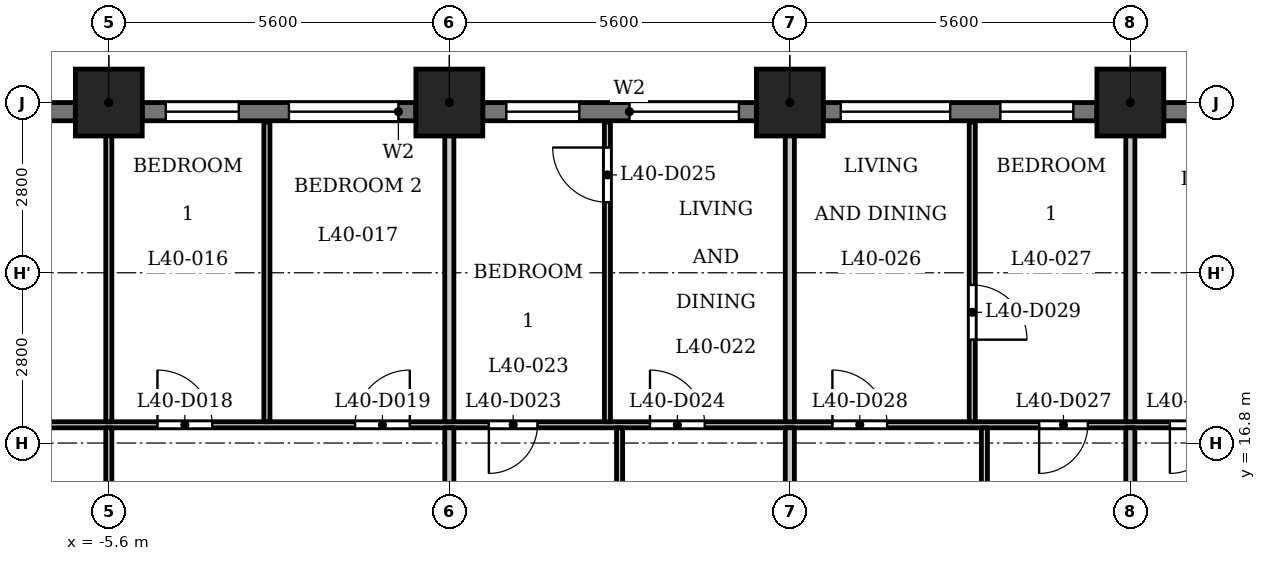
"""IFC4 building model, lengths in metres.
Left out: names, types, materials, properties, quantities, classifications, styles, units other than length and angle.
Written with IfcOpenShell. Run it as: python <this file> out.ifc"""

import sys

from ifc_helpers import new_model, si_unit, direction, frame, frame_2d, origin, origin_2d, place, context, subcontext, project, spatial, rectangle, extrude, element, fill, save


model = new_model("IFC4")
c1 = context("Model", 3, precision=1e-05, world=origin(), true_north=direction((0.0, 1.0)))
c2 = subcontext(c1, "Body", "Model", "MODEL_VIEW")
j1 = project(units=[si_unit("LENGTHUNIT", "METRE"), si_unit("PLANEANGLEUNIT", "RADIAN")], contexts=[c1])
p1 = place(None, origin())
s1 = spatial("IfcSite", under=j1, at=p1, CompositionType="ELEMENT")
p2 = place(p1, origin())
s2 = spatial("IfcBuilding", under=s1, at=p2, CompositionType="ELEMENT")
p3 = place(p2, frame((0.0, 0.0, 157.1)))
s3 = spatial("IfcBuildingStorey", under=s2, at=p3, CompositionType="ELEMENT", Elevation=157.1)
for number, where, z_axis, x_axis in (
    (1, (11.2, 22.4, 0.0), (0.0, 0.0, 1.0), (1.0, 0.0, 0.0)),
    (2, (5.6, 22.4, 0.0), (0.0, 0.0, 1.0), (1.0, 0.0, 0.0)),
    (3, (0.0, 22.4, 0.0), (0.0, 0.0, 1.0), (1.0, 0.0, 0.0)),
    (4, (-5.6, 22.4, 0.0), (0.0, 0.0, 1.0), (1.0, 0.0, 0.0)),
):
    element("IfcColumn", number, at=place(p3, frame(where, z_axis=z_axis, x_axis=x_axis)), inside=s3, PredefinedType="COLUMN", context=c2, shape_type="SweptSolid", body=[
        extrude(rectangle(XDim=1.1, YDim=1.1, at=origin_2d()), origin(), (0.0, 0.0, 1.0), 3.5),
    ])
p4 = place(p3, frame((16.25, 22.25, 0.0), z_axis=(0.0, 0.0, 1.0), x_axis=(-1.0, 0.0, 0.0)))
e5 = element("IfcWall", 5, at=p4, inside=s3, PredefinedType="SOLIDWALL", context=c2, shape_type="SweptSolid", body=[
    extrude(rectangle(XDim=4.5, YDim=0.3, at=frame_2d((2.25, 0.0))), origin(), (0.0, 0.0, 1.0), 2.45),
])
p5 = place(p4, frame((0.45, 0.0, 1.2)))
e6 = element("IfcOpeningElement", 6, at=p5, cuts=e5, PredefinedType="OPENING", context=c2, shape_type="SweptSolid", body=[
    extrude(rectangle(XDim=3.6, YDim=0.95, at=frame_2d((1.8, 0.475))), frame((0.0, 0.16, 0.0), z_axis=(0.0, -1.0, 0.0), x_axis=(1.0, 0.0, 0.0)), (0.0, 0.0, 1.0), 0.32),
])
p6 = place(p3, frame((10.65, 22.25, 0.0), z_axis=(0.0, 0.0, 1.0), x_axis=(-1.0, 0.0, 0.0)))
e7 = element("IfcWall", 7, at=p6, inside=s3, PredefinedType="SOLIDWALL", context=c2, shape_type="SweptSolid", body=[
    extrude(rectangle(XDim=4.5, YDim=0.3, at=frame_2d((2.25, 0.0))), origin(), (0.0, 0.0, 1.0), 2.45),
])
p7 = place(p6, frame((0.387, 0.0, 0.6)))
e8 = element("IfcOpeningElement", 8, at=p7, cuts=e7, PredefinedType="OPENING", context=c2, shape_type="SweptSolid", body=[
    extrude(rectangle(XDim=1.2, YDim=1.55, at=frame_2d((0.6, 0.775))), frame((0.0, 0.16, 0.0), z_axis=(0.0, -1.0, 0.0), x_axis=(1.0, 0.0, 0.0)), (0.0, 0.0, 1.0), 0.32),
])
p8 = place(p6, frame((2.413, 0.0, 0.9)))
e9 = element("IfcOpeningElement", 9, at=p8, cuts=e7, PredefinedType="OPENING", context=c2, shape_type="SweptSolid", body=[
    extrude(rectangle(XDim=1.8, YDim=1.25, at=frame_2d((0.9, 0.625))), frame((0.0, 0.16, 0.0), z_axis=(0.0, -1.0, 0.0), x_axis=(1.0, 0.0, 0.0)), (0.0, 0.0, 1.0), 0.32),
])
p9 = place(p3, frame((5.05, 22.25, 0.0), z_axis=(0.0, 0.0, 1.0), x_axis=(-1.0, 0.0, 0.0)))
e10 = element("IfcWall", 10, at=p9, inside=s3, PredefinedType="SOLIDWALL", context=c2, shape_type="SweptSolid", body=[
    extrude(rectangle(XDim=4.5, YDim=0.3, at=frame_2d((2.25, 0.0))), origin(), (0.0, 0.0, 1.0), 2.45),
])
p10 = place(p9, frame((0.288, 0.0, 0.9)))
e11 = element("IfcOpeningElement", 11, at=p10, cuts=e10, PredefinedType="OPENING", context=c2, shape_type="SweptSolid", body=[
    extrude(rectangle(XDim=1.8, YDim=1.25, at=frame_2d((0.9, 0.625))), frame((0.0, 0.16, 0.0), z_axis=(0.0, -1.0, 0.0), x_axis=(1.0, 0.0, 0.0)), (0.0, 0.0, 1.0), 0.32),
])
p11 = place(p9, frame((2.913, 0.0, 0.6)))
e12 = element("IfcOpeningElement", 12, at=p11, cuts=e10, PredefinedType="OPENING", context=c2, shape_type="SweptSolid", body=[
    extrude(rectangle(XDim=1.2, YDim=1.55, at=frame_2d((0.6, 0.775))), frame((0.0, 0.16, 0.0), z_axis=(0.0, -1.0, 0.0), x_axis=(1.0, 0.0, 0.0)), (0.0, 0.0, 1.0), 0.32),
])
p12 = place(p3, frame((-0.55, 22.25, 0.0), z_axis=(0.0, 0.0, 1.0), x_axis=(-1.0, 0.0, 0.0)))
e13 = element("IfcWall", 13, at=p12, inside=s3, PredefinedType="SOLIDWALL", context=c2, shape_type="SweptSolid", body=[
    extrude(rectangle(XDim=4.5, YDim=0.3, at=frame_2d((2.25, 0.0))), origin(), (0.0, 0.0, 1.0), 2.45),
])
p13 = place(p12, frame((0.288, 0.0, 0.9)))
e14 = element("IfcOpeningElement", 14, at=p13, cuts=e13, PredefinedType="OPENING", context=c2, shape_type="SweptSolid", body=[
    extrude(rectangle(XDim=1.8, YDim=1.25, at=frame_2d((0.9, 0.625))), frame((0.0, 0.16, 0.0), z_axis=(0.0, -1.0, 0.0), x_axis=(1.0, 0.0, 0.0)), (0.0, 0.0, 1.0), 0.32),
])
p14 = place(p12, frame((2.913, 0.0, 0.6)))
e15 = element("IfcOpeningElement", 15, at=p14, cuts=e13, PredefinedType="OPENING", context=c2, shape_type="SweptSolid", body=[
    extrude(rectangle(XDim=1.2, YDim=1.55, at=frame_2d((0.6, 0.775))), frame((0.0, 0.16, 0.0), z_axis=(0.0, -1.0, 0.0), x_axis=(1.0, 0.0, 0.0)), (0.0, 0.0, 1.0), 0.32),
])
p15 = place(p3, frame((-6.15, 22.25, 0.0), z_axis=(0.0, 0.0, 1.0), x_axis=(-1.0, 0.0, 0.0)))
e16 = element("IfcWall", 16, at=p15, inside=s3, PredefinedType="SOLIDWALL", context=c2, shape_type="SweptSolid", body=[
    extrude(rectangle(XDim=4.5, YDim=0.3, at=frame_2d((2.25, 0.0))), origin(), (0.0, 0.0, 1.0), 2.45),
])
p16 = place(p15, frame((0.45, 0.0, 1.2)))
e17 = element("IfcOpeningElement", 17, at=p16, cuts=e16, PredefinedType="OPENING", context=c2, shape_type="SweptSolid", body=[
    extrude(rectangle(XDim=3.6, YDim=0.95, at=frame_2d((1.8, 0.475))), frame((0.0, 0.16, 0.0), z_axis=(0.0, -1.0, 0.0), x_axis=(1.0, 0.0, 0.0)), (0.0, 0.0, 1.0), 0.32),
])
p17 = place(p3, frame((-16.725, 17.1, 0.0), z_axis=(0.0, 0.0, 1.0), x_axis=(1.0, 0.0, 0.0)))
e18 = element("IfcWall", 18, at=p17, inside=s3, PredefinedType="PARTITIONING", context=c2, shape_type="SweptSolid", body=[
    extrude(rectangle(XDim=33.45, YDim=0.1, at=frame_2d((16.725, 0.0))), origin(), (0.0, 0.0, 1.0), 3.2),
])
p18 = place(p17, frame((11.925, 0.0, 0.0)))
e19 = element("IfcOpeningElement", 19, at=p18, cuts=e18, PredefinedType="OPENING", context=c2, shape_type="SweptSolid", body=[
    extrude(rectangle(XDim=0.9, YDim=2.1, at=frame_2d((0.45, 1.05))), frame((0.0, 0.06, 0.0), z_axis=(0.0, -1.0, 0.0), x_axis=(1.0, 0.0, 0.0)), (0.0, 0.0, 1.0), 0.12),
])
p19 = place(p17, frame((15.175, 0.0, 0.0)))
e20 = element("IfcOpeningElement", 20, at=p19, cuts=e18, PredefinedType="OPENING", context=c2, shape_type="SweptSolid", body=[
    extrude(rectangle(XDim=0.9, YDim=2.1, at=frame_2d((0.45, 1.05))), frame((0.0, 0.06, 0.0), z_axis=(0.0, -1.0, 0.0), x_axis=(1.0, 0.0, 0.0)), (0.0, 0.0, 1.0), 0.12),
])
p20 = place(p17, frame((6.575, 0.0, 0.0)))
e21 = element("IfcOpeningElement", 21, at=p20, cuts=e18, PredefinedType="OPENING", context=c2, shape_type="SweptSolid", body=[
    extrude(rectangle(XDim=0.9, YDim=2.1, at=frame_2d((0.45, 1.05))), frame((0.0, 0.06, 0.0), z_axis=(0.0, -1.0, 0.0), x_axis=(1.0, 0.0, 0.0)), (0.0, 0.0, 1.0), 0.12),
])
p21 = place(p17, frame((17.375, 0.0, 0.0)))
e22 = element("IfcOpeningElement", 22, at=p21, cuts=e18, PredefinedType="OPENING", context=c2, shape_type="SweptSolid", body=[
    extrude(rectangle(XDim=0.8, YDim=2.1, at=frame_2d((0.4, 1.05))), frame((0.0, 0.06, 0.0), z_axis=(0.0, -1.0, 0.0), x_axis=(1.0, 0.0, 0.0)), (0.0, 0.0, 1.0), 0.12),
])
p22 = place(p17, frame((20.025, 0.0, 0.0)))
e23 = element("IfcOpeningElement", 23, at=p22, cuts=e18, PredefinedType="OPENING", context=c2, shape_type="SweptSolid", body=[
    extrude(rectangle(XDim=0.9, YDim=2.1, at=frame_2d((0.45, 1.05))), frame((0.0, 0.06, 0.0), z_axis=(0.0, -1.0, 0.0), x_axis=(1.0, 0.0, 0.0)), (0.0, 0.0, 1.0), 0.12),
])
p23 = place(p17, frame((26.425, 0.0, 0.0)))
e24 = element("IfcOpeningElement", 24, at=p23, cuts=e18, PredefinedType="OPENING", context=c2, shape_type="SweptSolid", body=[
    extrude(rectangle(XDim=0.8, YDim=2.1, at=frame_2d((0.4, 1.05))), frame((0.0, 0.06, 0.0), z_axis=(0.0, -1.0, 0.0), x_axis=(1.0, 0.0, 0.0)), (0.0, 0.0, 1.0), 0.12),
])
p24 = place(p17, frame((23.025, 0.0, 0.0)))
e25 = element("IfcOpeningElement", 25, at=p24, cuts=e18, PredefinedType="OPENING", context=c2, shape_type="SweptSolid", body=[
    extrude(rectangle(XDim=0.9, YDim=2.1, at=frame_2d((0.45, 1.05))), frame((0.0, 0.06, 0.0), z_axis=(0.0, -1.0, 0.0), x_axis=(1.0, 0.0, 0.0)), (0.0, 0.0, 1.0), 0.12),
])
p25 = place(p17, frame((28.575, 0.0, 0.0)))
e26 = element("IfcOpeningElement", 26, at=p25, cuts=e18, PredefinedType="OPENING", context=c2, shape_type="SweptSolid", body=[
    extrude(rectangle(XDim=0.8, YDim=2.1, at=frame_2d((0.4, 1.05))), frame((0.0, 0.06, 0.0), z_axis=(0.0, -1.0, 0.0), x_axis=(1.0, 0.0, 0.0)), (0.0, 0.0, 1.0), 0.12),
])
p26 = place(p17, frame((30.725, 0.0, 0.0)))
e27 = element("IfcOpeningElement", 27, at=p26, cuts=e18, PredefinedType="OPENING", context=c2, shape_type="SweptSolid", body=[
    extrude(rectangle(XDim=0.9, YDim=2.1, at=frame_2d((0.45, 1.05))), frame((0.0, 0.06, 0.0), z_axis=(0.0, -1.0, 0.0), x_axis=(1.0, 0.0, 0.0)), (0.0, 0.0, 1.0), 0.12),
])
p27 = place(p3, frame((-5.6, 13.275, 0.0), z_axis=(0.0, 0.0, 1.0), x_axis=(0.0, 1.0, 0.0)))
e28 = element("IfcWall", 28, at=p27, inside=s3, PredefinedType="PARTITIONING", context=c2, shape_type="SweptSolid", body=[
    extrude(rectangle(XDim=3.775, YDim=0.1, at=frame_2d((1.888, 0.0))), origin(), (0.0, 0.0, 1.0), 3.2),
])
p28 = place(p27, frame((0.525, 0.0, 0.0)))
e29 = element("IfcOpeningElement", 29, at=p28, cuts=e28, PredefinedType="OPENING", context=c2, shape_type="SweptSolid", body=[
    extrude(rectangle(XDim=0.9, YDim=2.1, at=frame_2d((0.45, 1.05))), frame((0.0, 0.06, 0.0), z_axis=(0.0, -1.0, 0.0), x_axis=(1.0, 0.0, 0.0)), (0.0, 0.0, 1.0), 0.12),
])
p29 = place(p3, frame((-5.6, 17.15, 0.0), z_axis=(0.0, 0.0, 1.0), x_axis=(0.0, 1.0, 0.0)))
e30 = element("IfcWall", 30, at=p29, inside=s3, PredefinedType="PARTITIONING", context=c2, shape_type="SweptSolid", body=[
    extrude(rectangle(XDim=5.78, YDim=0.1, at=frame_2d((2.89, 0.0))), origin(), (0.0, 0.0, 1.0), 3.2),
])
p30 = place(p3, frame((-3.0, 17.15, 0.0), z_axis=(0.0, 0.0, 1.0), x_axis=(0.0, 1.0, 0.0)))
e31 = element("IfcWall", 31, at=p30, inside=s3, PredefinedType="PARTITIONING", context=c2, shape_type="SweptSolid", body=[
    extrude(rectangle(XDim=4.93, YDim=0.1, at=frame_2d((2.465, 0.0))), origin(), (0.0, 0.0, 1.0), 3.2),
])
p31 = place(p3, frame((0.0, 13.275, 0.0), z_axis=(0.0, 0.0, 1.0), x_axis=(0.0, 1.0, 0.0)))
e32 = element("IfcWall", 32, at=p31, inside=s3, PredefinedType="PARTITIONING", context=c2, shape_type="SweptSolid", body=[
    extrude(rectangle(XDim=3.775, YDim=0.15, at=frame_2d((1.888, 0.0))), origin(), (0.0, 0.0, 1.0), 3.2),
])
p32 = place(p3, frame((0.0, 17.15, 0.0), z_axis=(0.0, 0.0, 1.0), x_axis=(0.0, 1.0, 0.0)))
e33 = element("IfcWall", 33, at=p32, inside=s3, PredefinedType="PARTITIONING", context=c2, shape_type="SweptSolid", body=[
    extrude(rectangle(XDim=5.78, YDim=0.15, at=frame_2d((2.89, 0.0))), origin(), (0.0, 0.0, 1.0), 3.2),
])
p33 = place(p3, frame((2.6, 17.15, 0.0), z_axis=(0.0, 0.0, 1.0), x_axis=(0.0, 1.0, 0.0)))
e34 = element("IfcWall", 34, at=p33, inside=s3, PredefinedType="PARTITIONING", context=c2, shape_type="SweptSolid", body=[
    extrude(rectangle(XDim=4.93, YDim=0.1, at=frame_2d((2.465, 0.0))), origin(), (0.0, 0.0, 1.0), 3.2),
])
p34 = place(p33, frame((3.61, 0.0, 0.0)))
e35 = element("IfcOpeningElement", 35, at=p34, cuts=e34, PredefinedType="OPENING", context=c2, shape_type="SweptSolid", body=[
    extrude(rectangle(XDim=0.9, YDim=2.1, at=frame_2d((0.45, 1.05))), frame((0.0, 0.06, 0.0), z_axis=(0.0, -1.0, 0.0), x_axis=(1.0, 0.0, 0.0)), (0.0, 0.0, 1.0), 0.12),
])
p35 = place(p3, frame((2.8, 13.275, 0.0), z_axis=(0.0, 0.0, 1.0), x_axis=(0.0, 1.0, 0.0)))
e36 = element("IfcWall", 36, at=p35, inside=s3, PredefinedType="PARTITIONING", context=c2, shape_type="SweptSolid", body=[
    extrude(rectangle(XDim=3.775, YDim=0.1, at=frame_2d((1.888, 0.0))), origin(), (0.0, 0.0, 1.0), 3.2),
])
p36 = place(p3, frame((5.6, 13.275, 0.0), z_axis=(0.0, 0.0, 1.0), x_axis=(0.0, 1.0, 0.0)))
e37 = element("IfcWall", 37, at=p36, inside=s3, PredefinedType="PARTITIONING", context=c2, shape_type="SweptSolid", body=[
    extrude(rectangle(XDim=3.775, YDim=0.15, at=frame_2d((1.888, 0.0))), origin(), (0.0, 0.0, 1.0), 3.2),
])
p37 = place(p3, frame((5.6, 17.15, 0.0), z_axis=(0.0, 0.0, 1.0), x_axis=(0.0, 1.0, 0.0)))
e38 = element("IfcWall", 38, at=p37, inside=s3, PredefinedType="PARTITIONING", context=c2, shape_type="SweptSolid", body=[
    extrude(rectangle(XDim=5.78, YDim=0.15, at=frame_2d((2.89, 0.0))), origin(), (0.0, 0.0, 1.0), 3.2),
])
p38 = place(p3, frame((8.6, 17.15, 0.0), z_axis=(0.0, 0.0, 1.0), x_axis=(0.0, 1.0, 0.0)))
e39 = element("IfcWall", 39, at=p38, inside=s3, PredefinedType="PARTITIONING", context=c2, shape_type="SweptSolid", body=[
    extrude(rectangle(XDim=4.93, YDim=0.1, at=frame_2d((2.465, 0.0))), origin(), (0.0, 0.0, 1.0), 3.2),
])
p39 = place(p38, frame((1.35, 0.0, 0.0)))
e40 = element("IfcOpeningElement", 40, at=p39, cuts=e39, PredefinedType="OPENING", context=c2, shape_type="SweptSolid", body=[
    extrude(rectangle(XDim=0.9, YDim=2.1, at=frame_2d((0.45, 1.05))), frame((0.0, 0.06, 0.0), z_axis=(0.0, -1.0, 0.0), x_axis=(1.0, 0.0, 0.0)), (0.0, 0.0, 1.0), 0.12),
])
p40 = place(p3, frame((8.8, 13.275, 0.0), z_axis=(0.0, 0.0, 1.0), x_axis=(0.0, 1.0, 0.0)))
e41 = element("IfcWall", 41, at=p40, inside=s3, PredefinedType="PARTITIONING", context=c2, shape_type="SweptSolid", body=[
    extrude(rectangle(XDim=3.775, YDim=0.1, at=frame_2d((1.888, 0.0))), origin(), (0.0, 0.0, 1.0), 3.2),
])
p41 = place(p3, frame((11.2, 13.275, 0.0), z_axis=(0.0, 0.0, 1.0), x_axis=(0.0, 1.0, 0.0)))
e42 = element("IfcWall", 42, at=p41, inside=s3, PredefinedType="PARTITIONING", context=c2, shape_type="SweptSolid", body=[
    extrude(rectangle(XDim=3.775, YDim=0.15, at=frame_2d((1.888, 0.0))), origin(), (0.0, 0.0, 1.0), 3.2),
])
p42 = place(p3, frame((11.2, 17.15, 0.0), z_axis=(0.0, 0.0, 1.0), x_axis=(0.0, 1.0, 0.0)))
e43 = element("IfcWall", 43, at=p42, inside=s3, PredefinedType="PARTITIONING", context=c2, shape_type="SweptSolid", body=[
    extrude(rectangle(XDim=5.78, YDim=0.15, at=frame_2d((2.89, 0.0))), origin(), (0.0, 0.0, 1.0), 3.2),
])
p43 = place(p18, origin())
e44 = element("IfcDoor", 44, at=p43, inside=s3, OperationType="SINGLE_SWING_RIGHT", PredefinedType="DOOR", context=c2, shape_type="SweptSolid", body=[
    extrude(rectangle(XDim=0.9, YDim=2.1, at=frame_2d((0.45, 1.05))), frame((0.0, 0.025, 0.0), z_axis=(0.0, -1.0, 0.0), x_axis=(1.0, 0.0, 0.0)), (0.0, 0.0, 1.0), 0.05),
])
fill(e19, e44)
p44 = place(p19, origin())
e45 = element("IfcDoor", 45, at=p44, inside=s3, OperationType="SINGLE_SWING_LEFT", PredefinedType="DOOR", context=c2, shape_type="SweptSolid", body=[
    extrude(rectangle(XDim=0.9, YDim=2.1, at=frame_2d((0.45, 1.05))), frame((0.0, 0.025, 0.0), z_axis=(0.0, -1.0, 0.0), x_axis=(1.0, 0.0, 0.0)), (0.0, 0.0, 1.0), 0.05),
])
fill(e20, e45)
p45 = place(p21, origin())
e46 = element("IfcDoor", 46, at=p45, inside=s3, OperationType="SINGLE_SWING_LEFT", PredefinedType="DOOR", context=c2, shape_type="SweptSolid", body=[
    extrude(rectangle(XDim=0.8, YDim=2.1, at=frame_2d((0.4, 1.05))), frame((0.0, 0.025, 0.0), z_axis=(0.0, -1.0, 0.0), x_axis=(1.0, 0.0, 0.0)), (0.0, 0.0, 1.0), 0.05),
])
fill(e22, e46)
p46 = place(p22, origin())
e47 = element("IfcDoor", 47, at=p46, inside=s3, OperationType="SINGLE_SWING_RIGHT", PredefinedType="DOOR", context=c2, shape_type="SweptSolid", body=[
    extrude(rectangle(XDim=0.9, YDim=2.1, at=frame_2d((0.45, 1.05))), frame((0.0, 0.025, 0.0), z_axis=(0.0, -1.0, 0.0), x_axis=(1.0, 0.0, 0.0)), (0.0, 0.0, 1.0), 0.05),
])
fill(e23, e47)
p47 = place(p34, origin())
e48 = element("IfcDoor", 48, at=p47, inside=s3, OperationType="SINGLE_SWING_LEFT", PredefinedType="DOOR", context=c2, shape_type="SweptSolid", body=[
    extrude(rectangle(XDim=0.9, YDim=2.1, at=frame_2d((0.45, 1.05))), frame((0.0, 0.025, 0.0), z_axis=(0.0, -1.0, 0.0), x_axis=(1.0, 0.0, 0.0)), (0.0, 0.0, 1.0), 0.05),
])
fill(e35, e48)
p48 = place(p23, origin())
e49 = element("IfcDoor", 49, at=p48, inside=s3, OperationType="SINGLE_SWING_LEFT", PredefinedType="DOOR", context=c2, shape_type="SweptSolid", body=[
    extrude(rectangle(XDim=0.8, YDim=2.1, at=frame_2d((0.4, 1.05))), frame((0.0, 0.025, 0.0), z_axis=(0.0, -1.0, 0.0), x_axis=(1.0, 0.0, 0.0)), (0.0, 0.0, 1.0), 0.05),
])
fill(e24, e49)
p49 = place(p24, origin())
e50 = element("IfcDoor", 50, at=p49, inside=s3, OperationType="SINGLE_SWING_RIGHT", PredefinedType="DOOR", context=c2, shape_type="SweptSolid", body=[
    extrude(rectangle(XDim=0.9, YDim=2.1, at=frame_2d((0.45, 1.05))), frame((0.0, 0.025, 0.0), z_axis=(0.0, -1.0, 0.0), x_axis=(1.0, 0.0, 0.0)), (0.0, 0.0, 1.0), 0.05),
])
fill(e25, e50)
p50 = place(p39, origin())
e51 = element("IfcDoor", 51, at=p50, inside=s3, OperationType="SINGLE_SWING_LEFT", PredefinedType="DOOR", context=c2, shape_type="SweptSolid", body=[
    extrude(rectangle(XDim=0.9, YDim=2.1, at=frame_2d((0.45, 1.05))), frame((0.0, 0.025, 0.0), z_axis=(0.0, -1.0, 0.0), x_axis=(1.0, 0.0, 0.0)), (0.0, 0.0, 1.0), 0.05),
])
fill(e40, e51)
p51 = place(p25, origin())
e52 = element("IfcDoor", 52, at=p51, inside=s3, OperationType="SINGLE_SWING_LEFT", PredefinedType="DOOR", context=c2, shape_type="SweptSolid", body=[
    extrude(rectangle(XDim=0.8, YDim=2.1, at=frame_2d((0.4, 1.05))), frame((0.0, 0.025, 0.0), z_axis=(0.0, -1.0, 0.0), x_axis=(1.0, 0.0, 0.0)), (0.0, 0.0, 1.0), 0.05),
])
fill(e26, e52)
p52 = place(p7, origin())
e53 = element("IfcWindow", 53, at=p52, inside=s3, PartitioningType="SINGLE_PANEL", PredefinedType="WINDOW", context=c2, shape_type="SweptSolid", body=[
    extrude(rectangle(XDim=1.2, YDim=1.55, at=frame_2d((0.6, 0.775))), frame((0.0, 0.03, 0.0), z_axis=(0.0, -1.0, 0.0), x_axis=(1.0, 0.0, 0.0)), (0.0, 0.0, 1.0), 0.06),
])
fill(e8, e53)
p53 = place(p8, origin())
e54 = element("IfcWindow", 54, at=p53, inside=s3, PartitioningType="SINGLE_PANEL", PredefinedType="WINDOW", context=c2, shape_type="SweptSolid", body=[
    extrude(rectangle(XDim=1.8, YDim=1.25, at=frame_2d((0.9, 0.625))), frame((0.0, 0.03, 0.0), z_axis=(0.0, -1.0, 0.0), x_axis=(1.0, 0.0, 0.0)), (0.0, 0.0, 1.0), 0.06),
])
fill(e9, e54)
p54 = place(p10, origin())
e55 = element("IfcWindow", 55, at=p54, inside=s3, PartitioningType="SINGLE_PANEL", PredefinedType="WINDOW", context=c2, shape_type="SweptSolid", body=[
    extrude(rectangle(XDim=1.8, YDim=1.25, at=frame_2d((0.9, 0.625))), frame((0.0, 0.03, 0.0), z_axis=(0.0, -1.0, 0.0), x_axis=(1.0, 0.0, 0.0)), (0.0, 0.0, 1.0), 0.06),
])
fill(e11, e55)
p55 = place(p11, origin())
e56 = element("IfcWindow", 56, at=p55, inside=s3, PartitioningType="SINGLE_PANEL", PredefinedType="WINDOW", context=c2, shape_type="SweptSolid", body=[
    extrude(rectangle(XDim=1.2, YDim=1.55, at=frame_2d((0.6, 0.775))), frame((0.0, 0.03, 0.0), z_axis=(0.0, -1.0, 0.0), x_axis=(1.0, 0.0, 0.0)), (0.0, 0.0, 1.0), 0.06),
])
fill(e12, e56)
p56 = place(p13, origin())
e57 = element("IfcWindow", 57, at=p56, inside=s3, PartitioningType="SINGLE_PANEL", PredefinedType="WINDOW", context=c2, shape_type="SweptSolid", body=[
    extrude(rectangle(XDim=1.8, YDim=1.25, at=frame_2d((0.9, 0.625))), frame((0.0, 0.03, 0.0), z_axis=(0.0, -1.0, 0.0), x_axis=(1.0, 0.0, 0.0)), (0.0, 0.0, 1.0), 0.06),
])
fill(e14, e57)
p57 = place(p14, origin())
e58 = element("IfcWindow", 58, at=p57, inside=s3, PartitioningType="SINGLE_PANEL", PredefinedType="WINDOW", context=c2, shape_type="SweptSolid", body=[
    extrude(rectangle(XDim=1.2, YDim=1.55, at=frame_2d((0.6, 0.775))), frame((0.0, 0.03, 0.0), z_axis=(0.0, -1.0, 0.0), x_axis=(1.0, 0.0, 0.0)), (0.0, 0.0, 1.0), 0.06),
])
fill(e15, e58)
save(model, sys.argv[1])
